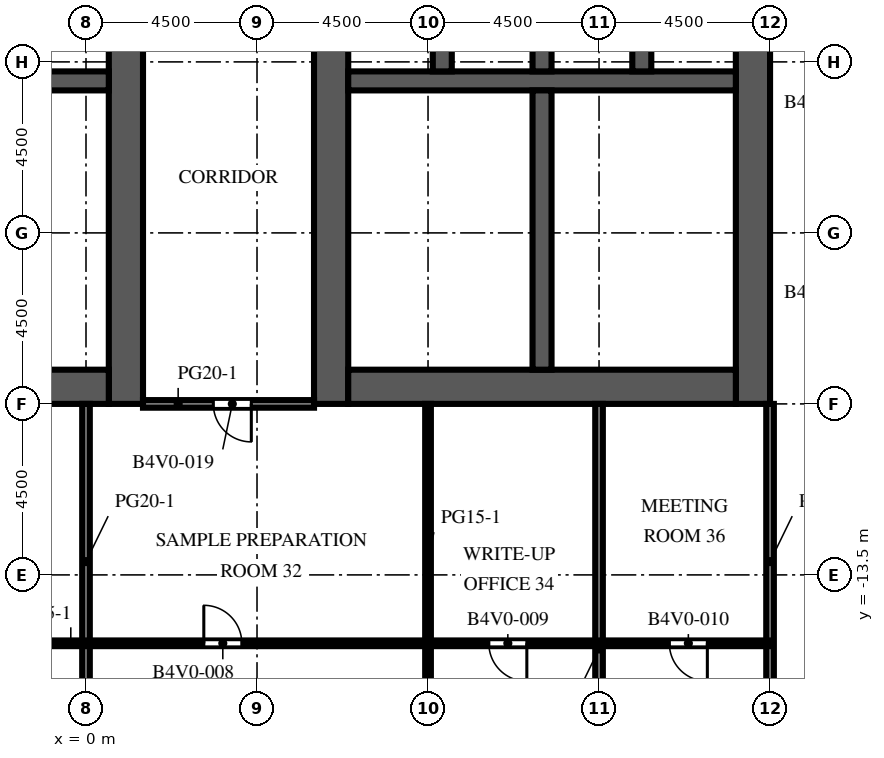
"""IFC4 building model, lengths in metres.
Left out: names, types, materials, properties, quantities, classifications, styles, units other than length and angle.
Written with IfcOpenShell. Run it as: python <this file> out.ifc"""

import sys

from ifc_helpers import new_model, si_unit, direction, frame, frame_2d, origin, place, context, subcontext, project, spatial, rectangle, extrude, element, fill, save


model = new_model("IFC4")
c1 = context("Model", 3, precision=1e-05, world=origin(), true_north=direction((0.0, 1.0)))
c2 = subcontext(c1, "Body", "Model", "MODEL_VIEW")
j1 = project(units=[si_unit("LENGTHUNIT", "METRE"), si_unit("PLANEANGLEUNIT", "RADIAN")], contexts=[c1])
p1 = place(None, origin())
s1 = spatial("IfcSite", under=j1, at=p1, CompositionType="ELEMENT")
p2 = place(p1, origin())
s2 = spatial("IfcBuilding", under=s1, at=p2, CompositionType="ELEMENT")
p3 = place(p2, frame((0.0, 0.0, 120.8)))
s3 = spatial("IfcBuildingStorey", under=s2, at=p3, CompositionType="ELEMENT", Elevation=120.8)
p4 = place(p3, frame((1.05, -9.0, 0.0), z_axis=(0.0, 0.0, 1.0), x_axis=(0.0, 1.0, 0.0)))
e1 = element("IfcWall", 1, at=p4, inside=s3, PredefinedType="SHEAR", context=c2, shape_type="SweptSolid", body=[
    extrude(rectangle(XDim=27.5, YDim=0.9, at=frame_2d((13.75, 0.0))), origin(), (0.0, 0.0, 1.0), 4.1),
])
p5 = place(p4, frame((12.55, 0.0, 0.0)))
e2 = element("IfcOpeningElement", 2, at=p5, cuts=e1, PredefinedType="OPENING", context=c2, shape_type="SweptSolid", body=[
    extrude(rectangle(XDim=2.4, YDim=2.4, at=frame_2d((1.2, 1.2))), frame((0.0, 0.46, 0.0), z_axis=(0.0, -1.0, 0.0), x_axis=(1.0, 0.0, 0.0)), (0.0, 0.0, 1.0), 0.92),
])
p6 = place(p4, frame((3.975, 0.0, 0.0)))
e3 = element("IfcOpeningElement", 3, at=p6, cuts=e1, PredefinedType="OPENING", context=c2, shape_type="SweptSolid", body=[
    extrude(rectangle(XDim=1.2, YDim=2.1, at=frame_2d((0.6, 1.05))), frame((0.0, 0.46, 0.0), z_axis=(0.0, -1.0, 0.0), x_axis=(1.0, 0.0, 0.0)), (0.0, 0.0, 1.0), 0.92),
])
p7 = place(p4, frame((19.485, 0.0, 0.0)))
e4 = element("IfcOpeningElement", 4, at=p7, cuts=e1, PredefinedType="OPENING", context=c2, shape_type="SweptSolid", body=[
    extrude(rectangle(XDim=1.0, YDim=2.1, at=frame_2d((0.5, 1.05))), frame((0.0, 0.46, 0.0), z_axis=(0.0, -1.0, 0.0), x_axis=(1.0, 0.0, 0.0)), (0.0, 0.0, 1.0), 0.92),
])
p8 = place(p4, frame((21.139, 0.0, 0.0)))
e5 = element("IfcOpeningElement", 5, at=p8, cuts=e1, PredefinedType="OPENING", context=c2, shape_type="SweptSolid", body=[
    extrude(rectangle(XDim=1.0, YDim=2.1, at=frame_2d((0.5, 1.05))), frame((0.0, 0.46, 0.0), z_axis=(0.0, -1.0, 0.0), x_axis=(1.0, 0.0, 0.0)), (0.0, 0.0, 1.0), 0.92),
])
p9 = place(p4, frame((23.16, 0.0, 0.0)))
e6 = element("IfcOpeningElement", 6, at=p9, cuts=e1, PredefinedType="OPENING", context=c2, shape_type="SweptSolid", body=[
    extrude(rectangle(XDim=1.0, YDim=2.1, at=frame_2d((0.5, 1.05))), frame((0.0, 0.46, 0.0), z_axis=(0.0, -1.0, 0.0), x_axis=(1.0, 0.0, 0.0)), (0.0, 0.0, 1.0), 0.92),
])
p10 = place(p4, frame((25.181, 0.0, 0.0)))
e7 = element("IfcOpeningElement", 7, at=p10, cuts=e1, PredefinedType="OPENING", context=c2, shape_type="SweptSolid", body=[
    extrude(rectangle(XDim=1.0, YDim=2.1, at=frame_2d((0.5, 1.05))), frame((0.0, 0.46, 0.0), z_axis=(0.0, -1.0, 0.0), x_axis=(1.0, 0.0, 0.0)), (0.0, 0.0, 1.0), 0.92),
])
p11 = place(p3, frame((-9.6, -8.55, 0.0), z_axis=(0.0, 0.0, 1.0), x_axis=(1.0, 0.0, 0.0)))
e8 = element("IfcWall", 8, at=p11, inside=s3, PredefinedType="SHEAR", context=c2, shape_type="SweptSolid", body=[
    extrude(rectangle(XDim=10.2, YDim=0.9, at=frame_2d((5.1, 0.0))), origin(), (0.0, 0.0, 1.0), 4.1),
])
p12 = place(p3, frame((-9.6, -0.5, 0.0), z_axis=(0.0, 0.0, 1.0), x_axis=(1.0, 0.0, 0.0)))
e9 = element("IfcWall", 9, at=p12, inside=s3, PredefinedType="SHEAR", context=c2, shape_type="SweptSolid", body=[
    extrude(rectangle(XDim=10.2, YDim=0.5, at=frame_2d((5.1, 0.0))), origin(), (0.0, 0.0, 1.0), 4.1),
])
p13 = place(p3, frame((6.45, -9.0, 0.0), z_axis=(0.0, 0.0, 1.0), x_axis=(0.0, 1.0, 0.0)))
e10 = element("IfcWall", 10, at=p13, inside=s3, PredefinedType="SHEAR", context=c2, shape_type="SweptSolid", body=[
    extrude(rectangle(XDim=27.5, YDim=0.9, at=frame_2d((13.75, 0.0))), origin(), (0.0, 0.0, 1.0), 4.1),
])
p14 = place(p13, frame((12.55, 0.0, 0.0)))
e11 = element("IfcOpeningElement", 11, at=p14, cuts=e10, PredefinedType="OPENING", context=c2, shape_type="SweptSolid", body=[
    extrude(rectangle(XDim=2.4, YDim=2.4, at=frame_2d((1.2, 1.2))), frame((0.0, 0.46, 0.0), z_axis=(0.0, -1.0, 0.0), x_axis=(1.0, 0.0, 0.0)), (0.0, 0.0, 1.0), 0.92),
])
p15 = place(p13, frame((3.975, 0.0, 0.0)))
e12 = element("IfcOpeningElement", 12, at=p15, cuts=e10, PredefinedType="OPENING", context=c2, shape_type="SweptSolid", body=[
    extrude(rectangle(XDim=1.2, YDim=2.1, at=frame_2d((0.6, 1.05))), frame((0.0, 0.46, 0.0), z_axis=(0.0, -1.0, 0.0), x_axis=(1.0, 0.0, 0.0)), (0.0, 0.0, 1.0), 0.92),
])
p16 = place(p13, frame((19.485, 0.0, 0.0)))
e13 = element("IfcOpeningElement", 13, at=p16, cuts=e10, PredefinedType="OPENING", context=c2, shape_type="SweptSolid", body=[
    extrude(rectangle(XDim=1.0, YDim=2.1, at=frame_2d((0.5, 1.05))), frame((0.0, 0.46, 0.0), z_axis=(0.0, -1.0, 0.0), x_axis=(1.0, 0.0, 0.0)), (0.0, 0.0, 1.0), 0.92),
])
p17 = place(p13, frame((21.139, 0.0, 0.0)))
e14 = element("IfcOpeningElement", 14, at=p17, cuts=e10, PredefinedType="OPENING", context=c2, shape_type="SweptSolid", body=[
    extrude(rectangle(XDim=1.0, YDim=2.1, at=frame_2d((0.5, 1.05))), frame((0.0, 0.46, 0.0), z_axis=(0.0, -1.0, 0.0), x_axis=(1.0, 0.0, 0.0)), (0.0, 0.0, 1.0), 0.92),
])
p18 = place(p13, frame((23.16, 0.0, 0.0)))
e15 = element("IfcOpeningElement", 15, at=p18, cuts=e10, PredefinedType="OPENING", context=c2, shape_type="SweptSolid", body=[
    extrude(rectangle(XDim=1.0, YDim=2.1, at=frame_2d((0.5, 1.05))), frame((0.0, 0.46, 0.0), z_axis=(0.0, -1.0, 0.0), x_axis=(1.0, 0.0, 0.0)), (0.0, 0.0, 1.0), 0.92),
])
p19 = place(p13, frame((25.181, 0.0, 0.0)))
e16 = element("IfcOpeningElement", 16, at=p19, cuts=e10, PredefinedType="OPENING", context=c2, shape_type="SweptSolid", body=[
    extrude(rectangle(XDim=1.0, YDim=2.1, at=frame_2d((0.5, 1.05))), frame((0.0, 0.46, 0.0), z_axis=(0.0, -1.0, 0.0), x_axis=(1.0, 0.0, 0.0)), (0.0, 0.0, 1.0), 0.92),
])
p20 = place(p3, frame((17.55, -9.0, 0.0), z_axis=(0.0, 0.0, 1.0), x_axis=(0.0, 1.0, 0.0)))
e17 = element("IfcWall", 17, at=p20, inside=s3, PredefinedType="SHEAR", context=c2, shape_type="SweptSolid", body=[
    extrude(rectangle(XDim=27.5, YDim=0.9, at=frame_2d((13.75, 0.0))), origin(), (0.0, 0.0, 1.0), 4.1),
])
p21 = place(p20, frame((12.55, 0.0, 0.0)))
e18 = element("IfcOpeningElement", 18, at=p21, cuts=e17, PredefinedType="OPENING", context=c2, shape_type="SweptSolid", body=[
    extrude(rectangle(XDim=2.4, YDim=2.4, at=frame_2d((1.2, 1.2))), frame((0.0, 0.46, 0.0), z_axis=(0.0, -1.0, 0.0), x_axis=(1.0, 0.0, 0.0)), (0.0, 0.0, 1.0), 0.92),
])
p22 = place(p20, frame((6.825, 0.0, 0.0)))
e19 = element("IfcOpeningElement", 19, at=p22, cuts=e17, PredefinedType="OPENING", context=c2, shape_type="SweptSolid", body=[
    extrude(rectangle(XDim=1.2, YDim=2.1, at=frame_2d((0.6, 1.05))), frame((0.0, 0.46, 0.0), z_axis=(0.0, -1.0, 0.0), x_axis=(1.0, 0.0, 0.0)), (0.0, 0.0, 1.0), 0.92),
])
p23 = place(p20, frame((19.475, 0.0, 0.0)))
e20 = element("IfcOpeningElement", 20, at=p23, cuts=e17, PredefinedType="OPENING", context=c2, shape_type="SweptSolid", body=[
    extrude(rectangle(XDim=1.2, YDim=2.1, at=frame_2d((0.6, 1.05))), frame((0.0, 0.46, 0.0), z_axis=(0.0, -1.0, 0.0), x_axis=(1.0, 0.0, 0.0)), (0.0, 0.0, 1.0), 0.92),
])
p24 = place(p3, frame((6.9, -8.55, 0.0), z_axis=(0.0, 0.0, 1.0), x_axis=(1.0, 0.0, 0.0)))
e21 = element("IfcWall", 21, at=p24, inside=s3, PredefinedType="SHEAR", context=c2, shape_type="SweptSolid", body=[
    extrude(rectangle(XDim=10.2, YDim=0.9, at=frame_2d((5.1, 0.0))), origin(), (0.0, 0.0, 1.0), 4.1),
])
p25 = place(p3, frame((6.9, -0.5, 0.0), z_axis=(0.0, 0.0, 1.0), x_axis=(1.0, 0.0, 0.0)))
e22 = element("IfcWall", 22, at=p25, inside=s3, PredefinedType="SHEAR", context=c2, shape_type="SweptSolid", body=[
    extrude(rectangle(XDim=10.2, YDim=0.5, at=frame_2d((5.1, 0.0))), origin(), (0.0, 0.0, 1.0), 4.1),
])
for number, where, z_axis, x_axis in (
    (23, (9.375, -0.25, 0.0), (0.0, 0.0, 1.0), (0.0, 1.0, 0.0)),
    (24, (12.0, -0.25, 0.0), (0.0, 0.0, 1.0), (0.0, 1.0, 0.0)),
    (25, (14.625, -0.25, 0.0), (0.0, 0.0, 1.0), (0.0, 1.0, 0.0)),
):
    element("IfcWall", number, at=place(p3, frame(where, z_axis=z_axis, x_axis=x_axis)), inside=s3, PredefinedType="SHEAR", context=c2, shape_type="SweptSolid", body=[
        extrude(rectangle(XDim=2.8, YDim=0.5, at=frame_2d((1.4, 0.0))), origin(), (0.0, 0.0, 1.0), 4.1),
    ])
p26 = place(p3, frame((12.0, -8.1, 0.0), z_axis=(0.0, 0.0, 1.0), x_axis=(0.0, 1.0, 0.0)))
e26 = element("IfcWall", 26, at=p26, inside=s3, PredefinedType="SHEAR", context=c2, shape_type="SweptSolid", body=[
    extrude(rectangle(XDim=7.35, YDim=0.5, at=frame_2d((3.675, 0.0))), origin(), (0.0, 0.0, 1.0), 4.1),
])
p27 = place(p3, frame((-1.0, -5.895, 0.0), z_axis=(0.0, 0.0, 1.0), x_axis=(1.0, 0.0, 0.0)))
e27 = element("IfcWall", 27, at=p27, inside=s3, PredefinedType="PARTITIONING", context=c2, shape_type="SweptSolid", body=[
    extrude(rectangle(XDim=1.6, YDim=0.1, at=frame_2d((0.8, 0.0))), origin(), (0.0, 0.0, 1.0), 3.65),
])
p28 = place(p27, frame((0.3, 0.0, 0.0)))
e28 = element("IfcOpeningElement", 28, at=p28, cuts=e27, PredefinedType="OPENING", context=c2, shape_type="SweptSolid", body=[
    extrude(rectangle(XDim=1.0, YDim=2.1, at=frame_2d((0.5, 1.05))), frame((0.0, 0.06, 0.0), z_axis=(0.0, -1.0, 0.0), x_axis=(1.0, 0.0, 0.0)), (0.0, 0.0, 1.0), 0.12),
])
p29 = place(p3, frame((-1.0, -2.955, 0.0), z_axis=(0.0, 0.0, 1.0), x_axis=(1.0, 0.0, 0.0)))
e29 = element("IfcWall", 29, at=p29, inside=s3, PredefinedType="PARTITIONING", context=c2, shape_type="SweptSolid", body=[
    extrude(rectangle(XDim=1.6, YDim=0.1, at=frame_2d((0.8, 0.0))), origin(), (0.0, 0.0, 1.0), 3.65),
])
p30 = place(p29, frame((0.3, 0.0, 0.0)))
e30 = element("IfcOpeningElement", 30, at=p30, cuts=e29, PredefinedType="OPENING", context=c2, shape_type="SweptSolid", body=[
    extrude(rectangle(XDim=1.0, YDim=2.1, at=frame_2d((0.5, 1.05))), frame((0.0, 0.06, 0.0), z_axis=(0.0, -1.0, 0.0), x_axis=(1.0, 0.0, 0.0)), (0.0, 0.0, 1.0), 0.12),
])
p31 = place(p3, frame((6.9, -5.895, 0.0), z_axis=(0.0, 0.0, 1.0), x_axis=(1.0, 0.0, 0.0)))
e31 = element("IfcWall", 31, at=p31, inside=s3, PredefinedType="PARTITIONING", context=c2, shape_type="SweptSolid", body=[
    extrude(rectangle(XDim=1.6, YDim=0.1, at=frame_2d((0.8, 0.0))), origin(), (0.0, 0.0, 1.0), 3.65),
])
p32 = place(p31, frame((0.3, 0.0, 0.0)))
e32 = element("IfcOpeningElement", 32, at=p32, cuts=e31, PredefinedType="OPENING", context=c2, shape_type="SweptSolid", body=[
    extrude(rectangle(XDim=1.0, YDim=2.1, at=frame_2d((0.5, 1.05))), frame((0.0, 0.06, 0.0), z_axis=(0.0, -1.0, 0.0), x_axis=(1.0, 0.0, 0.0)), (0.0, 0.0, 1.0), 0.12),
])
p33 = place(p3, frame((6.9, -2.955, 0.0), z_axis=(0.0, 0.0, 1.0), x_axis=(1.0, 0.0, 0.0)))
e33 = element("IfcWall", 33, at=p33, inside=s3, PredefinedType="PARTITIONING", context=c2, shape_type="SweptSolid", body=[
    extrude(rectangle(XDim=1.6, YDim=0.1, at=frame_2d((0.8, 0.0))), origin(), (0.0, 0.0, 1.0), 3.65),
])
p34 = place(p33, frame((0.3, 0.0, 0.0)))
e34 = element("IfcOpeningElement", 34, at=p34, cuts=e33, PredefinedType="OPENING", context=c2, shape_type="SweptSolid", body=[
    extrude(rectangle(XDim=1.0, YDim=2.1, at=frame_2d((0.5, 1.05))), frame((0.0, 0.06, 0.0), z_axis=(0.0, -1.0, 0.0), x_axis=(1.0, 0.0, 0.0)), (0.0, 0.0, 1.0), 0.12),
])
p35 = place(p3, frame((8.5, -5.895, 0.0), z_axis=(0.0, 0.0, 1.0), x_axis=(0.0, 1.0, 0.0)))
e35 = element("IfcWall", 35, at=p35, inside=s3, PredefinedType="PARTITIONING", context=c2, shape_type="SweptSolid", body=[
    extrude(rectangle(XDim=2.94, YDim=0.1, at=frame_2d((1.47, 0.0))), origin(), (0.0, 0.0, 1.0), 3.65),
])
p36 = place(p35, frame((0.97, 0.0, 0.0)))
e36 = element("IfcOpeningElement", 36, at=p36, cuts=e35, PredefinedType="OPENING", context=c2, shape_type="SweptSolid", body=[
    extrude(rectangle(XDim=1.0, YDim=2.1, at=frame_2d((0.5, 1.05))), frame((0.0, 0.06, 0.0), z_axis=(0.0, -1.0, 0.0), x_axis=(1.0, 0.0, 0.0)), (0.0, 0.0, 1.0), 0.12),
])
for number, where, z_axis, x_axis in (
    (37, (8.5, -5.895, 0.0), (0.0, 0.0, 1.0), (1.0, 0.0, 0.0)),
    (38, (8.5, -2.955, 0.0), (0.0, 0.0, 1.0), (1.0, 0.0, 0.0)),
):
    element("IfcWall", number, at=place(p3, frame(where, z_axis=z_axis, x_axis=x_axis)), inside=s3, PredefinedType="PARTITIONING", context=c2, shape_type="SweptSolid", body=[
        extrude(rectangle(XDim=3.25, YDim=0.1, at=frame_2d((1.625, 0.0))), origin(), (0.0, 0.0, 1.0), 3.65),
    ])
p37 = place(p3, frame((0.0, -17.3, 0.0), z_axis=(0.0, 0.0, 1.0), x_axis=(0.0, 1.0, 0.0)))
e39 = element("IfcWall", 39, at=p37, inside=s3, PredefinedType="PARTITIONING", context=c2, shape_type="SweptSolid", body=[
    extrude(rectangle(XDim=8.3, YDim=0.2, at=frame_2d((4.15, 0.0))), origin(), (0.0, 0.0, 1.0), 3.65),
])
p38 = place(p3, frame((9.0, -17.3, 0.0), z_axis=(0.0, 0.0, 1.0), x_axis=(0.0, 1.0, 0.0)))
e40 = element("IfcWall", 40, at=p38, inside=s3, PredefinedType="PARTITIONING", context=c2, shape_type="SweptSolid", body=[
    extrude(rectangle(XDim=8.3, YDim=0.15, at=frame_2d((4.15, 0.0))), origin(), (0.0, 0.0, 1.0), 3.65),
])
p39 = place(p3, frame((13.5, -21.9, 0.0), z_axis=(0.0, 0.0, 1.0), x_axis=(0.0, 1.0, 0.0)))
e41 = element("IfcWall", 41, at=p39, inside=s3, PredefinedType="PARTITIONING", context=c2, shape_type="SweptSolid", body=[
    extrude(rectangle(XDim=12.9, YDim=0.2, at=frame_2d((6.45, 0.0))), origin(), (0.0, 0.0, 1.0), 3.65),
])
p40 = place(p3, frame((18.0, -17.3, 0.0), z_axis=(0.0, 0.0, 1.0), x_axis=(0.0, 1.0, 0.0)))
e42 = element("IfcWall", 42, at=p40, inside=s3, PredefinedType="PARTITIONING", context=c2, shape_type="SweptSolid", body=[
    extrude(rectangle(XDim=8.3, YDim=0.2, at=frame_2d((4.15, 0.0))), origin(), (0.0, 0.0, 1.0), 3.65),
])
p41 = place(p3, frame((-10.5, -15.3, 0.0), z_axis=(0.0, 0.0, 1.0), x_axis=(1.0, 0.0, 0.0)))
e43 = element("IfcWall", 43, at=p41, inside=s3, PredefinedType="PARTITIONING", context=c2, shape_type="SweptSolid", body=[
    extrude(rectangle(XDim=28.5, YDim=0.15, at=frame_2d((14.25, 0.0))), origin(), (0.0, 0.0, 1.0), 3.65),
])
p42 = place(p41, frame((5.6, 0.0, 0.0)))
e44 = element("IfcOpeningElement", 44, at=p42, cuts=e43, PredefinedType="OPENING", context=c2, shape_type="SweptSolid", body=[
    extrude(rectangle(XDim=1.0, YDim=2.1, at=frame_2d((0.5, 1.05))), frame((0.0, 0.085, 0.0), z_axis=(0.0, -1.0, 0.0), x_axis=(1.0, 0.0, 0.0)), (0.0, 0.0, 1.0), 0.17),
])
p43 = place(p41, frame((13.6, 0.0, 0.0)))
e45 = element("IfcOpeningElement", 45, at=p43, cuts=e43, PredefinedType="OPENING", context=c2, shape_type="SweptSolid", body=[
    extrude(rectangle(XDim=1.0, YDim=2.1, at=frame_2d((0.5, 1.05))), frame((0.0, 0.085, 0.0), z_axis=(0.0, -1.0, 0.0), x_axis=(1.0, 0.0, 0.0)), (0.0, 0.0, 1.0), 0.17),
])
p44 = place(p41, frame((21.1, 0.0, 0.0)))
e46 = element("IfcOpeningElement", 46, at=p44, cuts=e43, PredefinedType="OPENING", context=c2, shape_type="SweptSolid", body=[
    extrude(rectangle(XDim=1.0, YDim=2.1, at=frame_2d((0.5, 1.05))), frame((0.0, 0.085, 0.0), z_axis=(0.0, -1.0, 0.0), x_axis=(1.0, 0.0, 0.0)), (0.0, 0.0, 1.0), 0.17),
])
p45 = place(p41, frame((25.85, 0.0, 0.0)))
e47 = element("IfcOpeningElement", 47, at=p45, cuts=e43, PredefinedType="OPENING", context=c2, shape_type="SweptSolid", body=[
    extrude(rectangle(XDim=1.0, YDim=2.1, at=frame_2d((0.5, 1.05))), frame((0.0, 0.085, 0.0), z_axis=(0.0, -1.0, 0.0), x_axis=(1.0, 0.0, 0.0)), (0.0, 0.0, 1.0), 0.17),
])
p46 = place(p3, frame((6.0, -9.0, 0.0), z_axis=(0.0, 0.0, 1.0), x_axis=(-1.0, 0.0, 0.0)))
e48 = element("IfcWall", 48, at=p46, inside=s3, PredefinedType="PARTITIONING", context=c2, shape_type="SweptSolid", body=[
    extrude(rectangle(XDim=4.5, YDim=0.2, at=frame_2d((2.25, 0.0))), origin(), (0.0, 0.0, 1.0), 3.65),
])
p47 = place(p46, frame((1.65, 0.0, 0.0)))
e49 = element("IfcOpeningElement", 49, at=p47, cuts=e48, PredefinedType="OPENING", context=c2, shape_type="SweptSolid", body=[
    extrude(rectangle(XDim=1.0, YDim=2.1, at=frame_2d((0.5, 1.05))), frame((0.0, 0.11, 0.0), z_axis=(0.0, -1.0, 0.0), x_axis=(1.0, 0.0, 0.0)), (0.0, 0.0, 1.0), 0.22),
])
p48 = place(p22, frame((1.2, 0.0, 0.0), z_axis=(0.0, 0.0, 1.0), x_axis=(-1.0, 0.0, 0.0)))
e50 = element("IfcDoor", 50, at=p48, inside=s3, OperationType="SINGLE_SWING_LEFT", PredefinedType="DOOR", context=c2, shape_type="SweptSolid", body=[
    extrude(rectangle(XDim=1.2, YDim=2.1, at=frame_2d((0.6, 1.05))), frame((0.0, 0.025, 0.0), z_axis=(0.0, -1.0, 0.0), x_axis=(1.0, 0.0, 0.0)), (0.0, 0.0, 1.0), 0.05),
])
fill(e19, e50)
p49 = place(p6, origin())
e51 = element("IfcDoor", 51, at=p49, inside=s3, OperationType="SINGLE_SWING_LEFT", PredefinedType="DOOR", context=c2, shape_type="SweptSolid", body=[
    extrude(rectangle(XDim=1.2, YDim=2.1, at=frame_2d((0.6, 1.05))), frame((0.0, 0.425, 0.0), z_axis=(0.0, -1.0, 0.0), x_axis=(1.0, 0.0, 0.0)), (0.0, 0.0, 1.0), 0.05),
])
fill(e3, e51)
p50 = place(p28, origin())
e52 = element("IfcDoor", 52, at=p50, inside=s3, OperationType="SINGLE_SWING_RIGHT", PredefinedType="DOOR", context=c2, shape_type="SweptSolid", body=[
    extrude(rectangle(XDim=1.0, YDim=2.1, at=frame_2d((0.5, 1.05))), frame((0.0, 0.025, 0.0), z_axis=(0.0, -1.0, 0.0), x_axis=(1.0, 0.0, 0.0)), (0.0, 0.0, 1.0), 0.05),
])
fill(e28, e52)
p51 = place(p30, origin())
e53 = element("IfcDoor", 53, at=p51, inside=s3, OperationType="SINGLE_SWING_LEFT", PredefinedType="DOOR", context=c2, shape_type="SweptSolid", body=[
    extrude(rectangle(XDim=1.0, YDim=2.1, at=frame_2d((0.5, 1.05))), frame((0.0, 0.025, 0.0), z_axis=(0.0, -1.0, 0.0), x_axis=(1.0, 0.0, 0.0)), (0.0, 0.0, 1.0), 0.05),
])
fill(e30, e53)
p52 = place(p15, origin())
e54 = element("IfcDoor", 54, at=p52, inside=s3, OperationType="SINGLE_SWING_RIGHT", PredefinedType="DOOR", context=c2, shape_type="SweptSolid", body=[
    extrude(rectangle(XDim=1.2, YDim=2.1, at=frame_2d((0.6, 1.05))), frame((0.0, -0.375, 0.0), z_axis=(0.0, -1.0, 0.0), x_axis=(1.0, 0.0, 0.0)), (0.0, 0.0, 1.0), 0.05),
])
fill(e12, e54)
p53 = place(p32, origin())
e55 = element("IfcDoor", 55, at=p53, inside=s3, OperationType="SINGLE_SWING_LEFT", PredefinedType="DOOR", context=c2, shape_type="SweptSolid", body=[
    extrude(rectangle(XDim=1.0, YDim=2.1, at=frame_2d((0.5, 1.05))), frame((0.0, 0.025, 0.0), z_axis=(0.0, -1.0, 0.0), x_axis=(1.0, 0.0, 0.0)), (0.0, 0.0, 1.0), 0.05),
])
fill(e32, e55)
p54 = place(p34, origin())
e56 = element("IfcDoor", 56, at=p54, inside=s3, OperationType="SINGLE_SWING_RIGHT", PredefinedType="DOOR", context=c2, shape_type="SweptSolid", body=[
    extrude(rectangle(XDim=1.0, YDim=2.1, at=frame_2d((0.5, 1.05))), frame((0.0, 0.025, 0.0), z_axis=(0.0, -1.0, 0.0), x_axis=(1.0, 0.0, 0.0)), (0.0, 0.0, 1.0), 0.05),
])
fill(e34, e56)
p55 = place(p36, origin())
e57 = element("IfcDoor", 57, at=p55, inside=s3, OperationType="SINGLE_SWING_LEFT", PredefinedType="DOOR", context=c2, shape_type="SweptSolid", body=[
    extrude(rectangle(XDim=1.0, YDim=2.1, at=frame_2d((0.5, 1.05))), frame((0.0, 0.025, 0.0), z_axis=(0.0, -1.0, 0.0), x_axis=(1.0, 0.0, 0.0)), (0.0, 0.0, 1.0), 0.05),
])
fill(e36, e57)
p56 = place(p43, origin())
e58 = element("IfcDoor", 58, at=p56, inside=s3, OperationType="SINGLE_SWING_LEFT", PredefinedType="DOOR", context=c2, shape_type="SweptSolid", body=[
    extrude(rectangle(XDim=1.0, YDim=2.1, at=frame_2d((0.5, 1.05))), frame((0.0, 0.025, 0.0), z_axis=(0.0, -1.0, 0.0), x_axis=(1.0, 0.0, 0.0)), (0.0, 0.0, 1.0), 0.05),
])
fill(e45, e58)
p57 = place(p44, origin())
e59 = element("IfcDoor", 59, at=p57, inside=s3, OperationType="SINGLE_SWING_RIGHT", PredefinedType="DOOR", context=c2, shape_type="SweptSolid", body=[
    extrude(rectangle(XDim=1.0, YDim=2.1, at=frame_2d((0.5, 1.05))), frame((0.0, 0.025, 0.0), z_axis=(0.0, -1.0, 0.0), x_axis=(1.0, 0.0, 0.0)), (0.0, 0.0, 1.0), 0.05),
])
fill(e46, e59)
p58 = place(p45, origin())
e60 = element("IfcDoor", 60, at=p58, inside=s3, OperationType="SINGLE_SWING_RIGHT", PredefinedType="DOOR", context=c2, shape_type="SweptSolid", body=[
    extrude(rectangle(XDim=1.0, YDim=2.1, at=frame_2d((0.5, 1.05))), frame((0.0, 0.025, 0.0), z_axis=(0.0, -1.0, 0.0), x_axis=(1.0, 0.0, 0.0)), (0.0, 0.0, 1.0), 0.05),
])
fill(e47, e60)
p59 = place(p47, origin())
e61 = element("IfcDoor", 61, at=p59, inside=s3, OperationType="SINGLE_SWING_LEFT", PredefinedType="DOOR", context=c2, shape_type="SweptSolid", body=[
    extrude(rectangle(XDim=1.0, YDim=2.1, at=frame_2d((0.5, 1.05))), frame((0.0, 0.025, 0.0), z_axis=(0.0, -1.0, 0.0), x_axis=(1.0, 0.0, 0.0)), (0.0, 0.0, 1.0), 0.05),
])
fill(e49, e61)
save(model, sys.argv[1])
